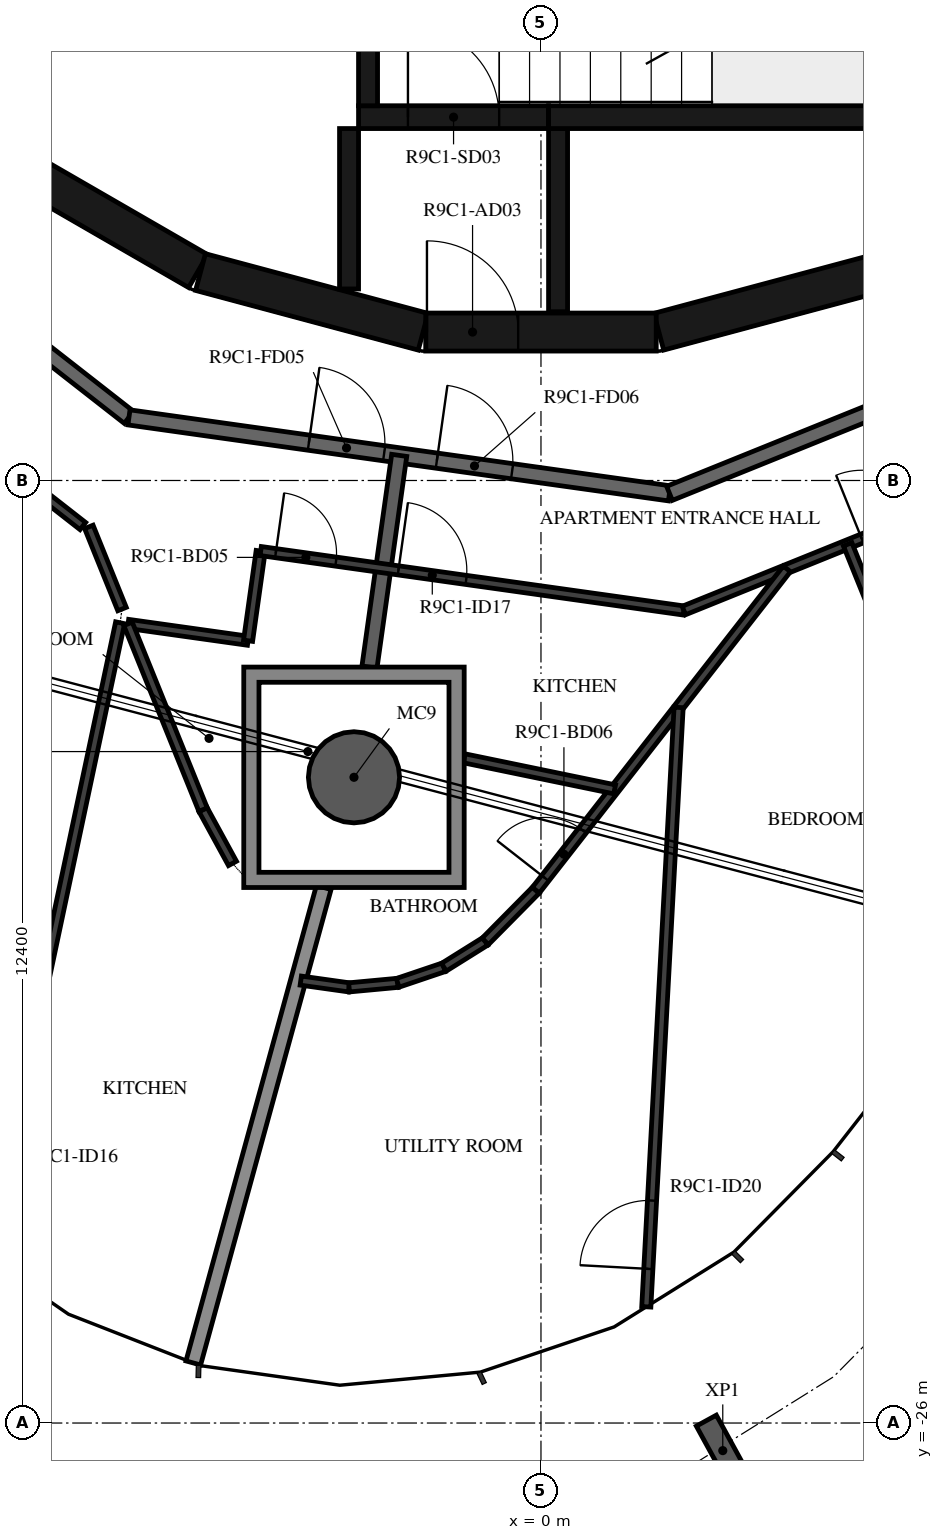
"""IFC4 building model, lengths in metres.
Left out: names, types, materials, properties, quantities, classifications, styles, units other than length and angle.
Written with IfcOpenShell. Run it as: python <this file> out.ifc"""

import sys

from ifc_helpers import new_model, si_unit, direction, frame, frame_2d, origin, origin_2d, place, context, subcontext, project, spatial, polyline, rectangle, hollow_circle, i_section, outline, extrude, element, fill, save


model = new_model("IFC4")
c1 = context("Model", 3, precision=1e-05, world=origin(), true_north=direction((0.0, 1.0)))
c2 = subcontext(c1, "Body", "Model", "MODEL_VIEW")
j1 = project(units=[si_unit("LENGTHUNIT", "METRE"), si_unit("PLANEANGLEUNIT", "RADIAN")], contexts=[c1])
p1 = place(None, origin())
s1 = spatial("IfcSite", under=j1, at=p1, CompositionType="ELEMENT")
p2 = place(p1, origin())
s2 = spatial("IfcBuilding", under=s1, at=p2, CompositionType="ELEMENT")
p3 = place(p2, frame((0.0, 0.0, 357.5)))
s3 = spatial("IfcBuildingStorey", under=s2, at=p3, CompositionType="ELEMENT", Elevation=357.5)
p4 = place(p3, frame((-2.46, -17.505, -0.38), z_axis=(0.0, 0.0, 1.0), x_axis=(1.0, 0.0, 0.0)))
e1 = element("IfcColumn", 1, at=p4, inside=s3, PredefinedType="COLUMN", context=c2, shape_type="SweptSolid", body=[
    extrude(hollow_circle(Radius=0.6, WallThickness=0.03, at=origin_2d()), origin(), (0.0, 0.0, 1.0), 3.5),
])
p5 = place(p3, frame((2.392, -26.363, -0.38), z_axis=(0.0, 0.0, 1.0), x_axis=(-0.877055410309, -0.480389224741, 0.0)))
e2 = element("IfcColumn", 2, at=p5, inside=s3, PredefinedType="COLUMN", context=c2, shape_type="SweptSolid", body=[
    extrude(i_section(OverallWidth=0.3, OverallDepth=0.9, WebThickness=0.019, FlangeThickness=0.035, FilletRadius=0.03, at=origin_2d()), origin(), (0.0, 0.0, 1.0), 3.5),
])
for number, where, z_axis, x_axis in (
    (3, (1.55, -11.643, 0.0), (0.0, 0.0, 1.0), (0.966, 0.259, 0.0)),
    (4, (-7.137, -9.329, 0.0), (0.0, 0.0, 1.0), (0.866, -0.5, 0.0)),
    (5, (-4.479, -10.858, 0.0), (0.0, 0.0, 1.0), (0.966, -0.259, 0.0)),
):
    element("IfcWall", number, at=place(p3, frame(where, z_axis=z_axis, x_axis=x_axis)), inside=s3, PredefinedType="SHEAR", context=c2, shape_type="SweptSolid", body=[
        extrude(rectangle(XDim=3.033, YDim=0.5, at=frame_2d((1.516, 0.0))), origin(), (0.0, 0.0, 1.0), 3.12),
    ])
p6 = place(p3, frame((-1.516, -11.647, 0.0), z_axis=(0.0, 0.0, 1.0), x_axis=(1.0, 0.0, 0.0)))
e6 = element("IfcWall", 6, at=p6, inside=s3, PredefinedType="SHEAR", context=c2, shape_type="SweptSolid", body=[
    extrude(rectangle(XDim=3.033, YDim=0.5, at=frame_2d((1.516, 0.0))), origin(), (0.0, 0.0, 1.0), 3.12),
])
p7 = place(p6, frame((0.016, 0.0, 0.0)))
e7 = element("IfcOpeningElement", 7, at=p7, cuts=e6, PredefinedType="OPENING", context=c2, shape_type="SweptSolid", body=[
    extrude(rectangle(XDim=1.2, YDim=2.1, at=frame_2d((0.6, 1.05))), frame((0.0, 0.26, 0.0), z_axis=(0.0, -1.0, 0.0), x_axis=(1.0, 0.0, 0.0)), (0.0, 0.0, 1.0), 0.52),
])
p8 = place(p3, frame((-2.275, -8.67, 0.0), z_axis=(0.0, 0.0, 1.0), x_axis=(0.0, 1.0, 0.0)))
e8 = element("IfcWall", 8, at=p8, inside=s3, PredefinedType="SHEAR", context=c2, shape_type="SweptSolid", body=[
    extrude(rectangle(XDim=3.32, YDim=0.25, at=frame_2d((1.66, 0.0))), origin(), (0.0, 0.0, 1.0), 3.12),
])
p9 = place(p3, frame((0.1, -8.82, 0.0), z_axis=(0.0, 0.0, 1.0), x_axis=(1.0, 0.0, 0.0)))
e9 = element("IfcWall", 9, at=p9, inside=s3, PredefinedType="SHEAR", context=c2, shape_type="SweptSolid", body=[
    extrude(rectangle(XDim=4.55, YDim=0.3, at=frame_2d((2.275, 0.0))), origin(), (0.0, 0.0, 1.0), 3.12),
])
p10 = place(p3, frame((-2.4, -8.82, 0.0), z_axis=(0.0, 0.0, 1.0), x_axis=(1.0, 0.0, 0.0)))
e10 = element("IfcWall", 10, at=p10, inside=s3, PredefinedType="SHEAR", context=c2, shape_type="SweptSolid", body=[
    extrude(rectangle(XDim=2.5, YDim=0.3, at=frame_2d((1.25, 0.0))), origin(), (0.0, 0.0, 1.0), 3.12),
])
p11 = place(p10, frame((0.65, 0.0, 0.0)))
e11 = element("IfcOpeningElement", 11, at=p11, cuts=e10, PredefinedType="OPENING", context=c2, shape_type="SweptSolid", body=[
    extrude(rectangle(XDim=1.2, YDim=2.1, at=frame_2d((0.6, 1.05))), frame((0.0, 0.16, 0.0), z_axis=(0.0, -1.0, 0.0), x_axis=(1.0, 0.0, 0.0)), (0.0, 0.0, 1.0), 0.32),
])
p12 = place(p3, frame((-2.525, -8.97, 0.0), z_axis=(0.0, 0.0, 1.0), x_axis=(0.0, -1.0, 0.0)))
e12 = element("IfcWall", 12, at=p12, inside=s3, PredefinedType="SHEAR", context=c2, shape_type="SweptSolid", body=[
    extrude(rectangle(XDim=2.11, YDim=0.25, at=frame_2d((1.055, 0.0))), origin(), (0.0, 0.0, 1.0), 3.12),
])
p13 = place(p3, frame((0.225, -8.97, 0.0), z_axis=(0.0, 0.0, 1.0), x_axis=(0.0, -1.0, 0.0)))
e13 = element("IfcWall", 13, at=p13, inside=s3, PredefinedType="SHEAR", context=c2, shape_type="SweptSolid", body=[
    extrude(rectangle(XDim=2.41, YDim=0.25, at=frame_2d((1.205, 0.0))), origin(), (0.0, 0.0, 1.0), 3.12),
])
p14 = place(p3, frame((-7.385, -8.681, 0.0), z_axis=(0.0, 0.0, 1.0), x_axis=(0.379804590409, 0.925066739811, 0.0)))
e14 = element("IfcWall", 14, at=p14, inside=s3, PredefinedType="PARTITIONING", context=c2, shape_type="SweptSolid", body=[
    extrude(rectangle(XDim=3.885, YDim=0.15, at=frame_2d((1.942, 0.0))), origin(), (0.0, 0.0, 1.0), 3.12),
])
p15 = place(p14, frame((1.493, 0.0, 0.0)))
e15 = element("IfcOpeningElement", 15, at=p15, cuts=e14, PredefinedType="OPENING", context=c2, shape_type="SweptSolid", body=[
    extrude(rectangle(XDim=0.9, YDim=2.1, at=frame_2d((0.45, 1.05))), frame((0.0, 0.085, 0.0), z_axis=(0.0, -1.0, 0.0), x_axis=(1.0, 0.0, 0.0)), (0.0, 0.0, 1.0), 0.17),
])
p16 = place(p3, frame((-11.079, -8.349, 0.0), z_axis=(0.0, 0.0, 1.0), x_axis=(0.78800478687, -0.615669112324, 0.0)))
e16 = element("IfcWall", 16, at=p16, inside=s3, PredefinedType="STANDARD", context=c2, shape_type="SweptSolid", body=[
    extrude(rectangle(XDim=7.181, YDim=0.2, at=frame_2d((3.591, 0.0))), origin(), (0.0, 0.0, 1.0), 3.12),
])
p17 = place(p3, frame((-5.42, -12.77, 0.0), z_axis=(0.0, 0.0, 1.0), x_axis=(0.990270565508, -0.139155334385, 0.0)))
e17 = element("IfcWall", 17, at=p17, inside=s3, PredefinedType="STANDARD", context=c2, shape_type="SweptSolid", body=[
    extrude(rectangle(XDim=7.181, YDim=0.2, at=frame_2d((3.59, 0.0))), origin(), (0.0, 0.0, 1.0), 3.12),
])
p18 = place(p17, frame((2.39, 0.0, 0.0)))
e18 = element("IfcOpeningElement", 18, at=p18, cuts=e17, PredefinedType="OPENING", context=c2, shape_type="SweptSolid", body=[
    extrude(rectangle(XDim=1.0, YDim=2.1, at=frame_2d((0.5, 1.05))), frame((0.0, 0.11, 0.0), z_axis=(0.0, -1.0, 0.0), x_axis=(1.0, 0.0, 0.0)), (0.0, 0.0, 1.0), 0.22),
])
p19 = place(p17, frame((4.091, 0.0, 0.0)))
e19 = element("IfcOpeningElement", 19, at=p19, cuts=e17, PredefinedType="OPENING", context=c2, shape_type="SweptSolid", body=[
    extrude(rectangle(XDim=1.0, YDim=2.1, at=frame_2d((0.5, 1.05))), frame((0.0, 0.11, 0.0), z_axis=(0.0, -1.0, 0.0), x_axis=(1.0, 0.0, 0.0)), (0.0, 0.0, 1.0), 0.22),
])
p20 = place(p3, frame((1.691, -13.769, 0.0), z_axis=(0.0, 0.0, 1.0), x_axis=(0.92717916932, 0.374618189599, 0.0)))
e20 = element("IfcWall", 20, at=p20, inside=s3, PredefinedType="STANDARD", context=c2, shape_type="SweptSolid", body=[
    extrude(rectangle(XDim=7.181, YDim=0.2, at=frame_2d((3.591, 0.0))), origin(), (0.0, 0.0, 1.0), 3.12),
])
p21 = place(p3, frame((-2.256, -16.055, 0.0), z_axis=(0.0, 0.0, 1.0), x_axis=(0.139148428478, 0.990271535919, 0.0)))
e21 = element("IfcWall", 21, at=p21, inside=s3, PredefinedType="STANDARD", context=c2, shape_type="SweptSolid", body=[
    extrude(rectangle(XDim=2.812, YDim=0.2, at=frame_2d((1.406, 0.0))), origin(), (0.0, 0.0, 1.0), 3.12),
])
p22 = place(p3, frame((-4.574, -25.21, 0.0), z_axis=(0.0, 0.0, 1.0), x_axis=(0.264579024648, 0.964364007892, 0.0)))
e22 = element("IfcWall", 22, at=p22, inside=s3, PredefinedType="STANDARD", context=c2, shape_type="SweptSolid", body=[
    extrude(rectangle(XDim=6.486, YDim=0.2, at=frame_2d((3.243, 0.0))), origin(), (0.0, 0.0, 1.0), 2.73),
])
p23 = place(p3, frame((-12.319, -9.283, 0.0), z_axis=(0.0, 0.0, 1.0), x_axis=(0.788000268464, -0.61567489546, 0.0)))
e23 = element("IfcWall", 23, at=p23, inside=s3, PredefinedType="PARTITIONING", context=c2, shape_type="SweptSolid", body=[
    extrude(rectangle(XDim=7.985, YDim=0.12, at=frame_2d((3.992, 0.0))), origin(), (0.0, 0.0, 1.0), 3.12),
])
p24 = place(p23, frame((6.051, 0.0, 0.0)))
e24 = element("IfcOpeningElement", 24, at=p24, cuts=e23, PredefinedType="OPENING", context=c2, shape_type="SweptSolid", body=[
    extrude(rectangle(XDim=0.9, YDim=2.1, at=frame_2d((0.45, 1.05))), frame((0.0, 0.07, 0.0), z_axis=(0.0, -1.0, 0.0), x_axis=(1.0, 0.0, 0.0)), (0.0, 0.0, 1.0), 0.14),
])
p25 = place(p3, frame((-5.948, -14.21, 0.0), z_axis=(0.0, 0.0, 1.0), x_axis=(0.374601530156, -0.927185900241, 0.0)))
e25 = element("IfcWall", 25, at=p25, inside=s3, PredefinedType="PARTITIONING", context=c2, shape_type="SweptSolid", body=[
    extrude(rectangle(XDim=1.166, YDim=0.12, at=frame_2d((0.583, 0.0))), origin(), (0.0, 0.0, 1.0), 3.12),
])
p26 = place(p3, frame((-5.433, -15.487, 0.0), z_axis=(0.0, 0.0, 1.0), x_axis=(0.990268451053, -0.139170380644, 0.0)))
e26 = element("IfcWall", 26, at=p26, inside=s3, PredefinedType="PARTITIONING", context=c2, shape_type="SweptSolid", body=[
    extrude(rectangle(XDim=1.595, YDim=0.12, at=frame_2d((0.797, 0.0))), origin(), (0.0, 0.0, 1.0), 3.12),
])
p27 = place(p3, frame((-3.854, -15.708, 0.0), z_axis=(0.0, 0.0, 1.0), x_axis=(0.139298773474, 0.99025039849, 0.0)))
e27 = element("IfcWall", 27, at=p27, inside=s3, PredefinedType="PARTITIONING", context=c2, shape_type="SweptSolid", body=[
    extrude(rectangle(XDim=1.192, YDim=0.12, at=frame_2d((0.596, 0.0))), origin(), (0.0, 0.0, 1.0), 3.12),
])
p28 = place(p3, frame((-3.688, -14.528, 0.0), z_axis=(0.0, 0.0, 1.0), x_axis=(0.990273413633, -0.139135064782, 0.0)))
e28 = element("IfcWall", 28, at=p28, inside=s3, PredefinedType="PARTITIONING", context=c2, shape_type="SweptSolid", body=[
    extrude(rectangle(XDim=5.622, YDim=0.12, at=frame_2d((2.811, 0.0))), origin(), (0.0, 0.0, 1.0), 3.12),
])
p29 = place(p28, frame((0.2, 0.0, 0.0)))
e29 = element("IfcOpeningElement", 29, at=p29, cuts=e28, PredefinedType="OPENING", context=c2, shape_type="SweptSolid", body=[
    extrude(rectangle(XDim=0.8, YDim=2.1, at=frame_2d((0.4, 1.05))), frame((0.0, 0.07, 0.0), z_axis=(0.0, -1.0, 0.0), x_axis=(1.0, 0.0, 0.0)), (0.0, 0.0, 1.0), 0.14),
])
p30 = place(p28, frame((1.83, 0.0, 0.0)))
e30 = element("IfcOpeningElement", 30, at=p30, cuts=e28, PredefinedType="OPENING", context=c2, shape_type="SweptSolid", body=[
    extrude(rectangle(XDim=0.9, YDim=2.1, at=frame_2d((0.45, 1.05))), frame((0.0, 0.07, 0.0), z_axis=(0.0, -1.0, 0.0), x_axis=(1.0, 0.0, 0.0)), (0.0, 0.0, 1.0), 0.14),
])
p31 = place(p3, frame((-7.305, -23.815, 0.0), z_axis=(0.0, 0.0, 1.0), x_axis=(0.207366409306, 0.978263345062, 0.0)))
e31 = element("IfcWall", 31, at=p31, inside=s3, PredefinedType="PARTITIONING", context=c2, shape_type="SweptSolid", body=[
    extrude(rectangle(XDim=8.529, YDim=0.12, at=frame_2d((4.264, 0.0))), origin(), (0.0, 0.0, 1.0), 3.12),
])
p32 = place(p31, frame((0.4, 0.0, 0.0)))
e32 = element("IfcOpeningElement", 32, at=p32, cuts=e31, PredefinedType="OPENING", context=c2, shape_type="SweptSolid", body=[
    extrude(rectangle(XDim=0.9, YDim=2.1, at=frame_2d((0.45, 1.05))), frame((0.0, 0.07, 0.0), z_axis=(0.0, -1.0, 0.0), x_axis=(1.0, 0.0, 0.0)), (0.0, 0.0, 1.0), 0.14),
])
p33 = place(p3, frame((-4.059, -18.638, 0.0), z_axis=(0.0, 0.0, 1.0), x_axis=(-0.479488268542, 0.877548289458, 0.0)))
e33 = element("IfcWall", 33, at=p33, inside=s3, PredefinedType="PARTITIONING", context=c2, shape_type="SweptSolid", body=[
    extrude(rectangle(XDim=0.807, YDim=0.12, at=frame_2d((0.403, 0.0))), origin(), (0.0, 0.0, 1.0), 3.12),
])
p34 = place(p3, frame((-4.445, -17.93, 0.0), z_axis=(0.0, 0.0, 1.0), x_axis=(-0.374614676827, 0.927180588616, 0.0)))
e34 = element("IfcWall", 34, at=p34, inside=s3, PredefinedType="PARTITIONING", context=c2, shape_type="SweptSolid", body=[
    extrude(rectangle(XDim=2.635, YDim=0.12, at=frame_2d((1.318, 0.0))), origin(), (0.0, 0.0, 1.0), 3.12),
])
p35 = place(p3, frame((1.88, -15.311, 0.0), z_axis=(0.0, 0.0, 1.0), x_axis=(0.927184866592, 0.374604088557, 0.0)))
e35 = element("IfcWall", 35, at=p35, inside=s3, PredefinedType="PARTITIONING", context=c2, shape_type="SweptSolid", body=[
    extrude(rectangle(XDim=7.985, YDim=0.12, at=frame_2d((3.993, 0.0))), origin(), (0.0, 0.0, 1.0), 3.12),
])
p36 = place(p35, frame((2.524, 0.0, 0.0)))
e36 = element("IfcOpeningElement", 36, at=p36, cuts=e35, PredefinedType="OPENING", context=c2, shape_type="SweptSolid", body=[
    extrude(rectangle(XDim=0.9, YDim=2.1, at=frame_2d((0.45, 1.05))), frame((0.0, 0.07, 0.0), z_axis=(0.0, -1.0, 0.0), x_axis=(1.0, 0.0, 0.0)), (0.0, 0.0, 1.0), 0.14),
])
p37 = place(p3, frame((-3.16, -20.179, 0.0), z_axis=(0.0, 0.0, 1.0), x_axis=(0.990266409014, -0.139184910023, 0.0)))
e37 = element("IfcWall", 37, at=p37, inside=s3, PredefinedType="PARTITIONING", context=c2, shape_type="SweptSolid", body=[
    extrude(rectangle(XDim=0.642, YDim=0.12, at=frame_2d((0.321, 0.0))), origin(), (0.0, 0.0, 1.0), 3.12),
])
for number, where, z_axis, x_axis in (
    (38, (-2.524, -20.269, 0.0), (0.0, 0.0, 1.0), (0.996, 0.093, 0.0)),
    (39, (-1.885, -20.209, 0.0), (0.0, 0.0, 1.0), (0.947, 0.32, 0.0)),
    (40, (-1.277, -20.004, 0.0), (0.0, 0.0, 1.0), (0.848, 0.53, 0.0)),
):
    element("IfcWall", number, at=place(p3, frame(where, z_axis=z_axis, x_axis=x_axis)), inside=s3, PredefinedType="PARTITIONING", context=c2, shape_type="SweptSolid", body=[
        extrude(rectangle(XDim=0.642, YDim=0.12, at=frame_2d((0.321, 0.0))), origin(), (0.0, 0.0, 1.0), 3.12),
    ])
p38 = place(p3, frame((-0.733, -19.663, 0.0), z_axis=(0.0, 0.0, 1.0), x_axis=(0.702968734621, 0.711220752049, 0.0)))
e41 = element("IfcWall", 41, at=p38, inside=s3, PredefinedType="PARTITIONING", context=c2, shape_type="SweptSolid", body=[
    extrude(rectangle(XDim=0.947, YDim=0.12, at=frame_2d((0.473, 0.0))), origin(), (0.0, 0.0, 1.0), 3.12),
])
p39 = place(p3, frame((-0.067, -18.99, 0.0), z_axis=(0.0, 0.0, 1.0), x_axis=(0.615678487989, 0.787997461562, 0.0)))
e42 = element("IfcWall", 42, at=p39, inside=s3, PredefinedType="PARTITIONING", context=c2, shape_type="SweptSolid", body=[
    extrude(rectangle(XDim=5.364, YDim=0.12, at=frame_2d((2.682, 0.0))), origin(), (0.0, 0.0, 1.0), 3.12),
])
p40 = place(p39, frame((0.2, 0.0, 0.0)))
e43 = element("IfcOpeningElement", 43, at=p40, cuts=e42, PredefinedType="OPENING", context=c2, shape_type="SweptSolid", body=[
    extrude(rectangle(XDim=0.8, YDim=2.1, at=frame_2d((0.4, 1.05))), frame((0.0, 0.07, 0.0), z_axis=(0.0, -1.0, 0.0), x_axis=(1.0, 0.0, 0.0)), (0.0, 0.0, 1.0), 0.14),
])
p41 = place(p3, frame((0.969, -17.663, 0.0), z_axis=(0.0, 0.0, 1.0), x_axis=(-0.979358667558, 0.202130156776, 0.0)))
e44 = element("IfcWall", 44, at=p41, inside=s3, PredefinedType="PARTITIONING", context=c2, shape_type="SweptSolid", body=[
    extrude(rectangle(XDim=2.021, YDim=0.12, at=frame_2d((1.01, 0.0))), origin(), (0.0, 0.0, 1.0), 3.12),
])
p42 = place(p3, frame((1.386, -24.471, 0.0), z_axis=(0.0, 0.0, 1.0), x_axis=(0.053855287289, 0.998548750954, 0.0)))
e45 = element("IfcWall", 45, at=p42, inside=s3, PredefinedType="PARTITIONING", context=c2, shape_type="SweptSolid", body=[
    extrude(rectangle(XDim=7.897, YDim=0.12, at=frame_2d((3.948, 0.0))), origin(), (0.0, 0.0, 1.0), 3.12),
])
p43 = place(p42, frame((0.5, 0.0, 0.0)))
e46 = element("IfcOpeningElement", 46, at=p43, cuts=e45, PredefinedType="OPENING", context=c2, shape_type="SweptSolid", body=[
    extrude(rectangle(XDim=0.9, YDim=2.1, at=frame_2d((0.45, 1.05))), frame((0.0, 0.07, 0.0), z_axis=(0.0, -1.0, 0.0), x_axis=(1.0, 0.0, 0.0)), (0.0, 0.0, 1.0), 0.14),
])
p44 = place(p3, frame((6.097, -19.546, 0.0), z_axis=(0.0, 0.0, 1.0), x_axis=(-0.374591330213, 0.927190021155, 0.0)))
e47 = element("IfcWall", 47, at=p44, inside=s3, PredefinedType="PARTITIONING", context=c2, shape_type="SweptSolid", body=[
    extrude(rectangle(XDim=5.507, YDim=0.12, at=frame_2d((2.753, 0.0))), origin(), (0.0, 0.0, 1.0), 3.12),
])
p45 = place(p44, frame((0.4, 0.0, 0.0)))
e48 = element("IfcOpeningElement", 48, at=p45, cuts=e47, PredefinedType="OPENING", context=c2, shape_type="SweptSolid", body=[
    extrude(rectangle(XDim=0.9, YDim=2.1, at=frame_2d((0.45, 1.05))), frame((0.0, 0.07, 0.0), z_axis=(0.0, -1.0, 0.0), x_axis=(1.0, 0.0, 0.0)), (0.0, 0.0, 1.0), 0.14),
])
p46 = place(p3, origin())
e49 = element("IfcWall", 49, at=p46, inside=s3, PredefinedType="STANDARD", context=c2, shape_type="SweptSolid", body=[
    extrude(outline(polyline([(-1.01, -16.055), (-1.01, -18.955), (-3.91, -18.955), (-3.91, -16.055), (-1.01, -16.055)]), holes=[polyline([(-3.71, -18.755), (-1.21, -18.755), (-1.21, -16.255), (-3.71, -16.255), (-3.71, -18.755)])]), origin(), (0.0, 0.0, 1.0), 3.12),
])
p47 = place(p11, origin())
e50 = element("IfcDoor", 50, at=p47, inside=s3, OperationType="SINGLE_SWING_LEFT", PredefinedType="DOOR", context=c2, shape_type="SweptSolid", body=[
    extrude(rectangle(XDim=1.2, YDim=2.1, at=frame_2d((0.6, 1.05))), frame((0.0, 0.025, 0.0), z_axis=(0.0, -1.0, 0.0), x_axis=(1.0, 0.0, 0.0)), (0.0, 0.0, 1.0), 0.05),
])
fill(e11, e50)
p48 = place(p7, origin())
e51 = element("IfcDoor", 51, at=p48, inside=s3, OperationType="SINGLE_SWING_RIGHT", PredefinedType="DOOR", context=c2, shape_type="SweptSolid", body=[
    extrude(rectangle(XDim=1.2, YDim=2.1, at=frame_2d((0.6, 1.05))), frame((0.0, 0.025, 0.0), z_axis=(0.0, -1.0, 0.0), x_axis=(1.0, 0.0, 0.0)), (0.0, 0.0, 1.0), 0.05),
])
fill(e7, e51)
p49 = place(p18, origin())
e52 = element("IfcDoor", 52, at=p49, inside=s3, OperationType="SINGLE_SWING_RIGHT", PredefinedType="DOOR", context=c2, shape_type="SweptSolid", body=[
    extrude(rectangle(XDim=1.0, YDim=2.1, at=frame_2d((0.5, 1.05))), frame((0.0, 0.025, 0.0), z_axis=(0.0, -1.0, 0.0), x_axis=(1.0, 0.0, 0.0)), (0.0, 0.0, 1.0), 0.05),
])
fill(e18, e52)
p50 = place(p29, origin())
e53 = element("IfcDoor", 53, at=p50, inside=s3, OperationType="SINGLE_SWING_RIGHT", PredefinedType="DOOR", context=c2, shape_type="SweptSolid", body=[
    extrude(rectangle(XDim=0.8, YDim=2.1, at=frame_2d((0.4, 1.05))), frame((0.0, 0.025, 0.0), z_axis=(0.0, -1.0, 0.0), x_axis=(1.0, 0.0, 0.0)), (0.0, 0.0, 1.0), 0.05),
])
fill(e29, e53)
p51 = place(p19, origin())
e54 = element("IfcDoor", 54, at=p51, inside=s3, OperationType="SINGLE_SWING_RIGHT", PredefinedType="DOOR", context=c2, shape_type="SweptSolid", body=[
    extrude(rectangle(XDim=1.0, YDim=2.1, at=frame_2d((0.5, 1.05))), frame((0.0, 0.025, 0.0), z_axis=(0.0, -1.0, 0.0), x_axis=(1.0, 0.0, 0.0)), (0.0, 0.0, 1.0), 0.05),
])
fill(e19, e54)
p52 = place(p30, origin())
e55 = element("IfcDoor", 55, at=p52, inside=s3, OperationType="SINGLE_SWING_RIGHT", PredefinedType="DOOR", context=c2, shape_type="SweptSolid", body=[
    extrude(rectangle(XDim=0.9, YDim=2.1, at=frame_2d((0.45, 1.05))), frame((0.0, 0.025, 0.0), z_axis=(0.0, -1.0, 0.0), x_axis=(1.0, 0.0, 0.0)), (0.0, 0.0, 1.0), 0.05),
])
fill(e30, e55)
p53 = place(p36, origin())
e56 = element("IfcDoor", 56, at=p53, inside=s3, OperationType="SINGLE_SWING_LEFT", PredefinedType="DOOR", context=c2, shape_type="SweptSolid", body=[
    extrude(rectangle(XDim=0.9, YDim=2.1, at=frame_2d((0.45, 1.05))), frame((0.0, 0.025, 0.0), z_axis=(0.0, -1.0, 0.0), x_axis=(1.0, 0.0, 0.0)), (0.0, 0.0, 1.0), 0.05),
])
fill(e36, e56)
p54 = place(p43, origin())
e57 = element("IfcDoor", 57, at=p54, inside=s3, OperationType="SINGLE_SWING_LEFT", PredefinedType="DOOR", context=c2, shape_type="SweptSolid", body=[
    extrude(rectangle(XDim=0.9, YDim=2.1, at=frame_2d((0.45, 1.05))), frame((0.0, 0.025, 0.0), z_axis=(0.0, -1.0, 0.0), x_axis=(1.0, 0.0, 0.0)), (0.0, 0.0, 1.0), 0.05),
])
fill(e46, e57)
p55 = place(p40, origin())
e58 = element("IfcDoor", 58, at=p55, inside=s3, OperationType="SINGLE_SWING_RIGHT", PredefinedType="DOOR", context=c2, shape_type="SweptSolid", body=[
    extrude(rectangle(XDim=0.8, YDim=2.1, at=frame_2d((0.4, 1.05))), frame((0.0, 0.025, 0.0), z_axis=(0.0, -1.0, 0.0), x_axis=(1.0, 0.0, 0.0)), (0.0, 0.0, 1.0), 0.05),
])
fill(e43, e58)
save(model, sys.argv[1])
